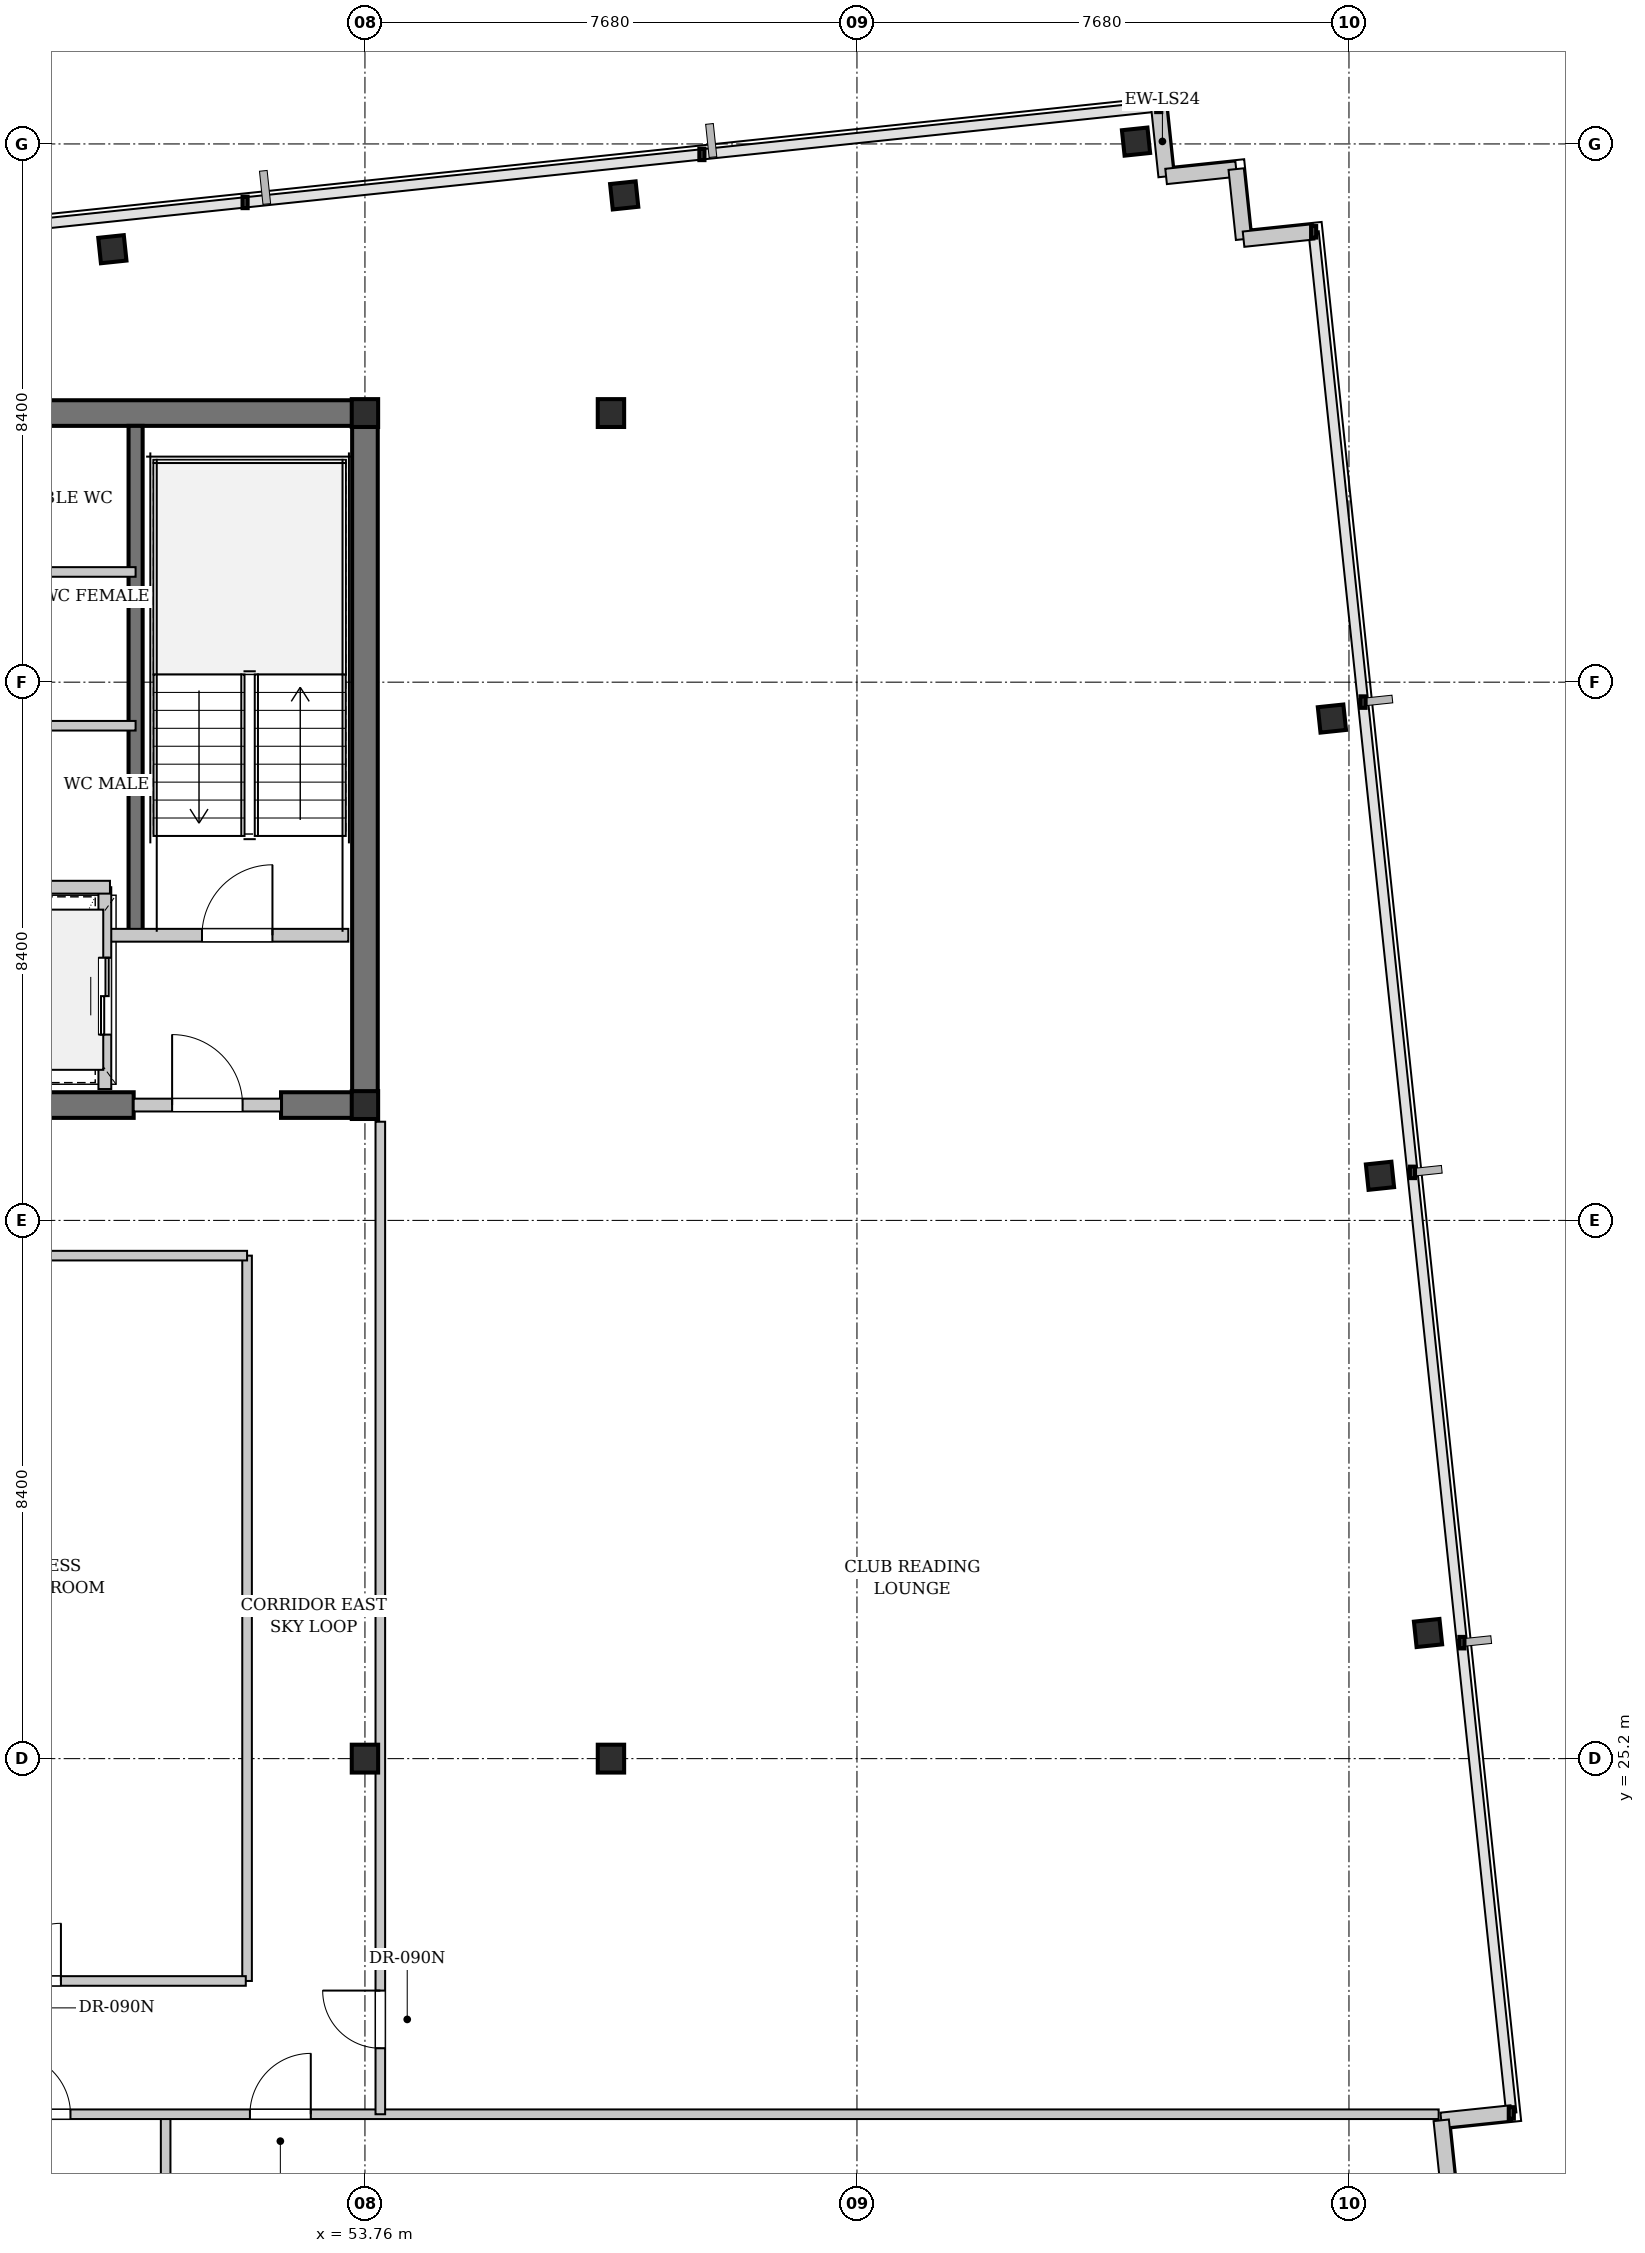
"""IFC4 building model, lengths in metres.
Left out: names, types, materials, properties, quantities, classifications, styles, units other than length and angle.
Written with IfcOpenShell. Run it as: python <this file> out.ifc"""

import sys

from ifc_helpers import new_model, si_unit, direction, frame, frame_2d, origin, origin_2d, place, context, subcontext, project, spatial, rectangle, i_section, extrude, element, fill, save


model = new_model("IFC4")
c1 = context("Model", 3, precision=1e-05, world=origin(), true_north=direction((0.0, 1.0)))
c2 = subcontext(c1, "Body", "Model", "MODEL_VIEW")
j1 = project(units=[si_unit("LENGTHUNIT", "METRE"), si_unit("PLANEANGLEUNIT", "RADIAN")], contexts=[c1])
p1 = place(None, origin())
s1 = spatial("IfcSite", under=j1, at=p1, CompositionType="ELEMENT")
p2 = place(p1, origin())
s2 = spatial("IfcBuilding", under=s1, at=p2, CompositionType="ELEMENT")
p3 = place(p2, frame((0.0, 0.0, 211.1)))
s3 = spatial("IfcBuildingStorey", under=s2, at=p3, CompositionType="ELEMENT", Elevation=211.1)
p4 = place(p3, frame((22.84, 46.2, 0.0), z_axis=(0.0, 0.0, 1.0), x_axis=(1.0, 0.0, 0.0)))
e1 = element("IfcWall", 1, at=p4, inside=s3, PredefinedType="SHEAR", context=c2, shape_type="SweptSolid", body=[
    extrude(rectangle(XDim=31.12, YDim=0.4, at=frame_2d((15.56, 0.0))), origin(), (0.0, 0.0, 1.0), 3.08),
])
p5 = place(p3, frame((42.1, 35.4, 0.0), z_axis=(0.0, 0.0, 1.0), x_axis=(1.0, 0.0, 0.0)))
e2 = element("IfcWall", 2, at=p5, inside=s3, PredefinedType="SHEAR", context=c2, shape_type="SweptSolid", body=[
    extrude(rectangle(XDim=8.05, YDim=0.4, at=frame_2d((4.025, 0.0))), origin(), (0.0, 0.0, 1.0), 3.08),
])
p6 = place(p5, frame((4.85, 0.0, 0.0)))
e3 = element("IfcOpeningElement", 3, at=p6, cuts=e2, PredefinedType="OPENING", context=c2, shape_type="SweptSolid", body=[
    extrude(rectangle(XDim=0.9, YDim=2.15, at=frame_2d((0.45, 1.075))), frame((0.0, 0.21, 0.0), z_axis=(0.0, -1.0, 0.0), x_axis=(1.0, 0.0, 0.0)), (0.0, 0.0, 1.0), 0.42),
])
p7 = place(p3, frame((52.45, 35.4, 0.0), z_axis=(0.0, 0.0, 1.0), x_axis=(1.0, 0.0, 0.0)))
e4 = element("IfcWall", 4, at=p7, inside=s3, PredefinedType="SHEAR", context=c2, shape_type="SweptSolid", body=[
    extrude(rectangle(XDim=1.51, YDim=0.4, at=frame_2d((0.755, 0.0))), origin(), (0.0, 0.0, 1.0), 3.08),
])
p8 = place(p3, frame((53.76, 35.6, 0.0), z_axis=(0.0, 0.0, 1.0), x_axis=(0.0, 1.0, 0.0)))
e5 = element("IfcWall", 5, at=p8, inside=s3, PredefinedType="SHEAR", context=c2, shape_type="SweptSolid", body=[
    extrude(rectangle(XDim=10.4, YDim=0.4, at=frame_2d((5.2, 0.0))), origin(), (0.0, 0.0, 1.0), 3.08),
])
p9 = place(p3, frame((50.18, 38.05, 0.0), z_axis=(0.0, 0.0, 1.0), x_axis=(0.0, 1.0, 0.0)))
e6 = element("IfcWall", 6, at=p9, inside=s3, PredefinedType="SHEAR", context=c2, shape_type="SweptSolid", body=[
    extrude(rectangle(XDim=7.95, YDim=0.22, at=frame_2d((3.975, 0.0))), origin(), (0.0, 0.0, 1.0), 3.08),
])
for number, where, z_axis, x_axis in (
    (7, (53.76, 35.4, 0.0), (0.0, 0.0, 1.0), (1.0, 0.0, 0.0)),
    (8, (53.76, 46.2, 0.0), (0.0, 0.0, 1.0), (1.0, 0.0, 0.0)),
    (9, (53.76, 25.2, 0.0), (0.0, 0.0, 1.0), (1.0, 0.0, 0.0)),
    (10, (57.6, 25.2, 0.0), (0.0, 0.0, 1.0), (1.0, 0.0, 0.0)),
    (11, (57.6, 46.2, 0.0), (0.0, 0.0, 1.0), (1.0, 0.0, 0.0)),
):
    element("IfcColumn", number, at=place(p3, frame(where, z_axis=z_axis, x_axis=x_axis)), inside=s3, PredefinedType="COLUMN", context=c2, shape_type="SweptSolid", body=[
        extrude(i_section(OverallWidth=0.412, OverallDepth=0.435, WebThickness=0.036, FlangeThickness=0.058, FilletRadius=0.015, at=origin_2d()), origin(), (0.0, 0.0, 1.0), 3.3),
    ])
for number, where, z_axis, x_axis in (
    (12, (49.817, 48.757, 0.0), (0.0, 0.0, 1.0), (0.995, 0.105, 0.0)),
    (13, (57.807, 49.597, 0.0), (0.0, 0.0, 1.0), (0.995, 0.105, 0.0)),
    (14, (65.796, 50.437, 0.0), (0.0, 0.0, 1.0), (0.995, 0.105, 0.0)),
    (15, (70.354, 27.16, 0.0), (0.0, 0.0, 1.0), (0.995, 0.105, 0.0)),
    (16, (69.604, 34.296, 0.0), (0.0, 0.0, 1.0), (0.995, 0.105, 0.0)),
    (17, (68.854, 41.432, 0.0), (0.0, 0.0, 1.0), (0.995, 0.105, 0.0)),
):
    element("IfcColumn", number, at=place(p3, frame(where, z_axis=z_axis, x_axis=x_axis)), inside=s3, PredefinedType="COLUMN", context=c2, shape_type="SweptSolid", body=[
        extrude(i_section(OverallWidth=0.401, OverallDepth=0.399, WebThickness=0.025, FlangeThickness=0.04, FilletRadius=0.015, at=origin_2d()), origin(), (0.0, 0.0, 1.0), 3.3),
    ])
for number, where, z_axis, x_axis in (
    (18, (66.15, 50.987, 0.0), (0.0, 0.0, 1.0), (0.105, -0.995, 0.0)),
    (19, (66.265, 49.893, 0.0), (0.0, 0.0, 1.0), (0.995, 0.105, 0.0)),
    (20, (67.359, 50.008, 0.0), (0.0, 0.0, 1.0), (0.105, -0.995, 0.0)),
    (21, (67.474, 48.914, 0.0), (0.0, 0.0, 1.0), (0.995, 0.105, 0.0)),
    (22, (71.654, 19.67, 0.0), (0.0, 0.0, 1.0), (-0.995, -0.105, 0.0)),
    (23, (70.56, 19.555, 0.0), (0.0, 0.0, 1.0), (0.105, -0.995, 0.0)),
):
    element("IfcWall", number, at=place(p3, frame(where, z_axis=z_axis, x_axis=x_axis)), inside=s3, PredefinedType="SOLIDWALL", context=c2, shape_type="SweptSolid", body=[
        extrude(rectangle(XDim=1.1, YDim=0.24, at=frame_2d((0.55, 0.0))), origin(), (0.0, 0.0, 1.0), 3.08),
    ])
p10 = place(p3, frame((49.78, 38.05, 0.0), z_axis=(0.0, 0.0, 1.0), x_axis=(1.0, 0.0, 0.0)))
e24 = element("IfcWall", 24, at=p10, inside=s3, PredefinedType="PARTITIONING", context=c2, shape_type="SweptSolid", body=[
    extrude(rectangle(XDim=3.72, YDim=0.2, at=frame_2d((1.86, 0.0))), origin(), (0.0, 0.0, 1.0), 3.08),
])
p11 = place(p10, frame((1.436, 0.0, 0.0)))
e25 = element("IfcOpeningElement", 25, at=p11, cuts=e24, PredefinedType="OPENING", context=c2, shape_type="SweptSolid", body=[
    extrude(rectangle(XDim=1.1, YDim=2.15, at=frame_2d((0.55, 1.075))), frame((0.0, 0.11, 0.0), z_axis=(0.0, -1.0, 0.0), x_axis=(1.0, 0.0, 0.0)), (0.0, 0.0, 1.0), 0.22),
])
p12 = place(p3, frame((50.15, 35.4, 0.0), z_axis=(0.0, 0.0, 1.0), x_axis=(1.0, 0.0, 0.0)))
e26 = element("IfcWall", 26, at=p12, inside=s3, PredefinedType="PARTITIONING", context=c2, shape_type="SweptSolid", body=[
    extrude(rectangle(XDim=2.3, YDim=0.2, at=frame_2d((1.15, 0.0))), origin(), (0.0, 0.0, 1.0), 2.313),
])
p13 = place(p12, frame((0.6, 0.0, 0.0)))
e27 = element("IfcOpeningElement", 27, at=p13, cuts=e26, PredefinedType="OPENING", context=c2, shape_type="SweptSolid", body=[
    extrude(rectangle(XDim=1.1, YDim=2.15, at=frame_2d((0.55, 1.075))), frame((0.0, 0.11, 0.0), z_axis=(0.0, -1.0, 0.0), x_axis=(1.0, 0.0, 0.0)), (0.0, 0.0, 1.0), 0.22),
])
p14 = place(p3, frame((49.7, 35.65, 0.0), z_axis=(0.0, 0.0, 1.0), x_axis=(0.0, 1.0, 0.0)))
e28 = element("IfcWall", 28, at=p14, inside=s3, PredefinedType="PARTITIONING", context=c2, shape_type="SweptSolid", body=[
    extrude(rectangle(XDim=3.15, YDim=0.2, at=frame_2d((1.575, 0.0))), origin(), (0.0, 0.0, 1.0), 3.08),
])
p15 = place(p14, frame((0.85, 0.0, 0.0)))
e29 = element("IfcOpeningElement", 29, at=p15, cuts=e28, PredefinedType="OPENING", context=c2, shape_type="SweptSolid", body=[
    extrude(rectangle(XDim=1.2, YDim=2.2, at=frame_2d((0.6, 1.1))), frame((0.0, 0.11, 0.0), z_axis=(0.0, -1.0, 0.0), x_axis=(1.0, 0.0, 0.0)), (0.0, 0.0, 1.0), 0.22),
])
p16 = place(p3, frame((47.92, 38.8, 0.0), z_axis=(0.0, 0.0, 1.0), x_axis=(1.0, 0.0, 0.0)))
e30 = element("IfcWall", 30, at=p16, inside=s3, PredefinedType="PARTITIONING", context=c2, shape_type="SweptSolid", body=[
    extrude(rectangle(XDim=1.86, YDim=0.2, at=frame_2d((0.93, 0.0))), origin(), (0.0, 0.0, 1.0), 3.08),
])
p17 = place(p3, frame((45.68, 43.72, 0.0), z_axis=(0.0, 0.0, 1.0), x_axis=(1.0, 0.0, 0.0)))
e31 = element("IfcWall", 31, at=p17, inside=s3, PredefinedType="PARTITIONING", context=c2, shape_type="SweptSolid", body=[
    extrude(rectangle(XDim=4.5, YDim=0.15, at=frame_2d((2.25, 0.0))), origin(), (0.0, 0.0, 1.0), 3.08),
])
p18 = place(p17, frame((0.55, 0.0, 0.0)))
e32 = element("IfcOpeningElement", 32, at=p18, cuts=e31, PredefinedType="OPENING", context=c2, shape_type="SweptSolid", body=[
    extrude(rectangle(XDim=0.95, YDim=2.15, at=frame_2d((0.475, 1.075))), frame((0.0, 0.085, 0.0), z_axis=(0.0, -1.0, 0.0), x_axis=(1.0, 0.0, 0.0)), (0.0, 0.0, 1.0), 0.17),
])
p19 = place(p3, frame((47.88, 41.32, 0.0), z_axis=(0.0, 0.0, 1.0), x_axis=(1.0, 0.0, 0.0)))
e33 = element("IfcWall", 33, at=p19, inside=s3, PredefinedType="PARTITIONING", context=c2, shape_type="SweptSolid", body=[
    extrude(rectangle(XDim=2.3, YDim=0.15, at=frame_2d((1.15, 0.0))), origin(), (0.0, 0.0, 1.0), 3.08),
])
p20 = place(p3, frame((50.649, 15.19, 0.0), z_axis=(0.0, 0.0, 1.0), x_axis=(0.0, 1.0, 0.0)))
e34 = element("IfcWall", 34, at=p20, inside=s3, PredefinedType="PARTITIONING", context=c2, shape_type="SweptSolid", body=[
    extrude(rectangle(XDim=4.48, YDim=0.15, at=frame_2d((2.24, 0.0))), origin(), (0.0, 0.0, 1.0), 3.08),
])
p21 = place(p3, frame((35.62, 19.65, 0.0), z_axis=(0.0, 0.0, 1.0), x_axis=(1.0, 0.0, 0.0)))
e35 = element("IfcWall", 35, at=p21, inside=s3, PredefinedType="PARTITIONING", context=c2, shape_type="SweptSolid", body=[
    extrude(rectangle(XDim=34.9, YDim=0.15, at=frame_2d((17.45, 0.0))), origin(), (0.0, 0.0, 1.0), 2.715),
])
p22 = place(p21, frame((2.454, 0.0, 0.0)))
e36 = element("IfcOpeningElement", 36, at=p22, cuts=e35, PredefinedType="OPENING", context=c2, shape_type="SweptSolid", body=[
    extrude(rectangle(XDim=0.95, YDim=2.15, at=frame_2d((0.475, 1.075))), frame((0.0, 0.085, 0.0), z_axis=(0.0, -1.0, 0.0), x_axis=(1.0, 0.0, 0.0)), (0.0, 0.0, 1.0), 0.17),
])
p23 = place(p21, frame((7.888, 0.0, 0.0)))
e37 = element("IfcOpeningElement", 37, at=p23, cuts=e35, PredefinedType="OPENING", context=c2, shape_type="SweptSolid", body=[
    extrude(rectangle(XDim=0.95, YDim=2.15, at=frame_2d((0.475, 1.075))), frame((0.0, 0.085, 0.0), z_axis=(0.0, -1.0, 0.0), x_axis=(1.0, 0.0, 0.0)), (0.0, 0.0, 1.0), 0.17),
])
p24 = place(p21, frame((12.594, 0.0, 0.0)))
e38 = element("IfcOpeningElement", 38, at=p24, cuts=e35, PredefinedType="OPENING", context=c2, shape_type="SweptSolid", body=[
    extrude(rectangle(XDim=0.95, YDim=2.15, at=frame_2d((0.475, 1.075))), frame((0.0, 0.085, 0.0), z_axis=(0.0, -1.0, 0.0), x_axis=(1.0, 0.0, 0.0)), (0.0, 0.0, 1.0), 0.17),
])
p25 = place(p21, frame((16.344, 0.0, 0.0)))
e39 = element("IfcOpeningElement", 39, at=p25, cuts=e35, PredefinedType="OPENING", context=c2, shape_type="SweptSolid", body=[
    extrude(rectangle(XDim=0.95, YDim=2.15, at=frame_2d((0.475, 1.075))), frame((0.0, 0.085, 0.0), z_axis=(0.0, -1.0, 0.0), x_axis=(1.0, 0.0, 0.0)), (0.0, 0.0, 1.0), 0.17),
])
p26 = place(p3, frame((54.0, 19.65, 0.0), z_axis=(0.0, 0.0, 1.0), x_axis=(0.0, 1.0, 0.0)))
e40 = element("IfcWall", 40, at=p26, inside=s3, PredefinedType="PARTITIONING", context=c2, shape_type="SweptSolid", body=[
    extrude(rectangle(XDim=15.49, YDim=0.15, at=frame_2d((7.745, 0.0))), origin(), (0.0, 0.0, 1.0), 3.08),
])
p27 = place(p26, frame((1.03, 0.0, 0.0)))
e41 = element("IfcOpeningElement", 41, at=p27, cuts=e40, PredefinedType="OPENING", context=c2, shape_type="SweptSolid", body=[
    extrude(rectangle(XDim=0.9, YDim=2.15, at=frame_2d((0.45, 1.075))), frame((0.0, 0.085, 0.0), z_axis=(0.0, -1.0, 0.0), x_axis=(1.0, 0.0, 0.0)), (0.0, 0.0, 1.0), 0.17),
])
p28 = place(p3, frame((51.92, 21.73, 0.0), z_axis=(0.0, 0.0, 1.0), x_axis=(0.0, 1.0, 0.0)))
e42 = element("IfcWall", 42, at=p28, inside=s3, PredefinedType="PARTITIONING", context=c2, shape_type="SweptSolid", body=[
    extrude(rectangle(XDim=11.32, YDim=0.15, at=frame_2d((5.66, 0.0))), origin(), (0.0, 0.0, 1.0), 3.08),
])
p29 = place(p3, frame((35.62, 33.05, 0.0), z_axis=(0.0, 0.0, 1.0), x_axis=(1.0, 0.0, 0.0)))
e43 = element("IfcWall", 43, at=p29, inside=s3, PredefinedType="PARTITIONING", context=c2, shape_type="SweptSolid", body=[
    extrude(rectangle(XDim=16.3, YDim=0.15, at=frame_2d((8.15, 0.0))), origin(), (0.0, 0.0, 1.0), 3.08),
])
p30 = place(p3, frame((35.63, 21.73, 0.0), z_axis=(0.0, 0.0, 1.0), x_axis=(1.0, 0.0, 0.0)))
e44 = element("IfcWall", 44, at=p30, inside=s3, PredefinedType="PARTITIONING", context=c2, shape_type="SweptSolid", body=[
    extrude(rectangle(XDim=16.27, YDim=0.15, at=frame_2d((8.135, 0.0))), origin(), (0.0, 0.0, 1.0), 3.08),
])
p31 = place(p30, frame((1.421, 0.0, 0.0)))
e45 = element("IfcOpeningElement", 45, at=p31, cuts=e44, PredefinedType="OPENING", context=c2, shape_type="SweptSolid", body=[
    extrude(rectangle(XDim=0.9, YDim=2.15, at=frame_2d((0.45, 1.075))), frame((0.0, 0.085, 0.0), z_axis=(0.0, -1.0, 0.0), x_axis=(1.0, 0.0, 0.0)), (0.0, 0.0, 1.0), 0.17),
])
p32 = place(p30, frame((6.22, 0.0, 0.0)))
e46 = element("IfcOpeningElement", 46, at=p32, cuts=e44, PredefinedType="OPENING", context=c2, shape_type="SweptSolid", body=[
    extrude(rectangle(XDim=0.9, YDim=2.15, at=frame_2d((0.45, 1.075))), frame((0.0, 0.085, 0.0), z_axis=(0.0, -1.0, 0.0), x_axis=(1.0, 0.0, 0.0)), (0.0, 0.0, 1.0), 0.17),
])
p33 = place(p30, frame((12.485, 0.0, 0.0)))
e47 = element("IfcOpeningElement", 47, at=p33, cuts=e44, PredefinedType="OPENING", context=c2, shape_type="SweptSolid", body=[
    extrude(rectangle(XDim=0.9, YDim=2.15, at=frame_2d((0.45, 1.075))), frame((0.0, 0.085, 0.0), z_axis=(0.0, -1.0, 0.0), x_axis=(1.0, 0.0, 0.0)), (0.0, 0.0, 1.0), 0.17),
])
p34 = place(p11, origin())
e48 = element("IfcDoor", 48, at=p34, inside=s3, OperationType="SINGLE_SWING_RIGHT", PredefinedType="DOOR", context=c2, shape_type="SweptSolid", body=[
    extrude(rectangle(XDim=1.1, YDim=2.15, at=frame_2d((0.55, 1.075))), frame((0.0, 0.025, 0.0), z_axis=(0.0, -1.0, 0.0), x_axis=(1.0, 0.0, 0.0)), (0.0, 0.0, 1.0), 0.05),
])
fill(e25, e48)
p35 = place(p13, origin())
e49 = element("IfcDoor", 49, at=p35, inside=s3, OperationType="SINGLE_SWING_LEFT", PredefinedType="DOOR", context=c2, shape_type="SweptSolid", body=[
    extrude(rectangle(XDim=1.1, YDim=2.15, at=frame_2d((0.55, 1.075))), frame((0.0, 0.025, 0.0), z_axis=(0.0, -1.0, 0.0), x_axis=(1.0, 0.0, 0.0)), (0.0, 0.0, 1.0), 0.05),
])
fill(e27, e49)
p36 = place(p15, origin())
e50 = element("IfcDoor", 50, at=p36, inside=s3, OperationType="DOUBLE_DOOR_SLIDING", PredefinedType="DOOR", context=c2, shape_type="SweptSolid", body=[
    extrude(rectangle(XDim=1.2, YDim=2.2, at=frame_2d((0.6, 1.1))), frame((0.0, 0.025, 0.0), z_axis=(0.0, -1.0, 0.0), x_axis=(1.0, 0.0, 0.0)), (0.0, 0.0, 1.0), 0.05),
])
fill(e29, e50)
p37 = place(p24, origin())
e51 = element("IfcDoor", 51, at=p37, inside=s3, OperationType="SINGLE_SWING_LEFT", PredefinedType="DOOR", context=c2, shape_type="SweptSolid", body=[
    extrude(rectangle(XDim=0.95, YDim=2.15, at=frame_2d((0.475, 1.075))), frame((0.0, 0.025, 0.0), z_axis=(0.0, -1.0, 0.0), x_axis=(1.0, 0.0, 0.0)), (0.0, 0.0, 1.0), 0.05),
])
fill(e38, e51)
p38 = place(p25, origin())
e52 = element("IfcDoor", 52, at=p38, inside=s3, OperationType="SINGLE_SWING_RIGHT", PredefinedType="DOOR", context=c2, shape_type="SweptSolid", body=[
    extrude(rectangle(XDim=0.95, YDim=2.15, at=frame_2d((0.475, 1.075))), frame((0.0, 0.025, 0.0), z_axis=(0.0, -1.0, 0.0), x_axis=(1.0, 0.0, 0.0)), (0.0, 0.0, 1.0), 0.05),
])
fill(e39, e52)
p39 = place(p27, origin())
e53 = element("IfcDoor", 53, at=p39, inside=s3, OperationType="SINGLE_SWING_RIGHT", PredefinedType="DOOR", context=c2, shape_type="SweptSolid", body=[
    extrude(rectangle(XDim=0.9, YDim=2.15, at=frame_2d((0.45, 1.075))), frame((0.0, 0.025, 0.0), z_axis=(0.0, -1.0, 0.0), x_axis=(1.0, 0.0, 0.0)), (0.0, 0.0, 1.0), 0.05),
])
fill(e41, e53)
p40 = place(p33, origin())
e54 = element("IfcDoor", 54, at=p40, inside=s3, OperationType="SINGLE_SWING_RIGHT", PredefinedType="DOOR", context=c2, shape_type="SweptSolid", body=[
    extrude(rectangle(XDim=0.9, YDim=2.15, at=frame_2d((0.45, 1.075))), frame((0.0, 0.025, 0.0), z_axis=(0.0, -1.0, 0.0), x_axis=(1.0, 0.0, 0.0)), (0.0, 0.0, 1.0), 0.05),
])
fill(e47, e54)
save(model, sys.argv[1])
